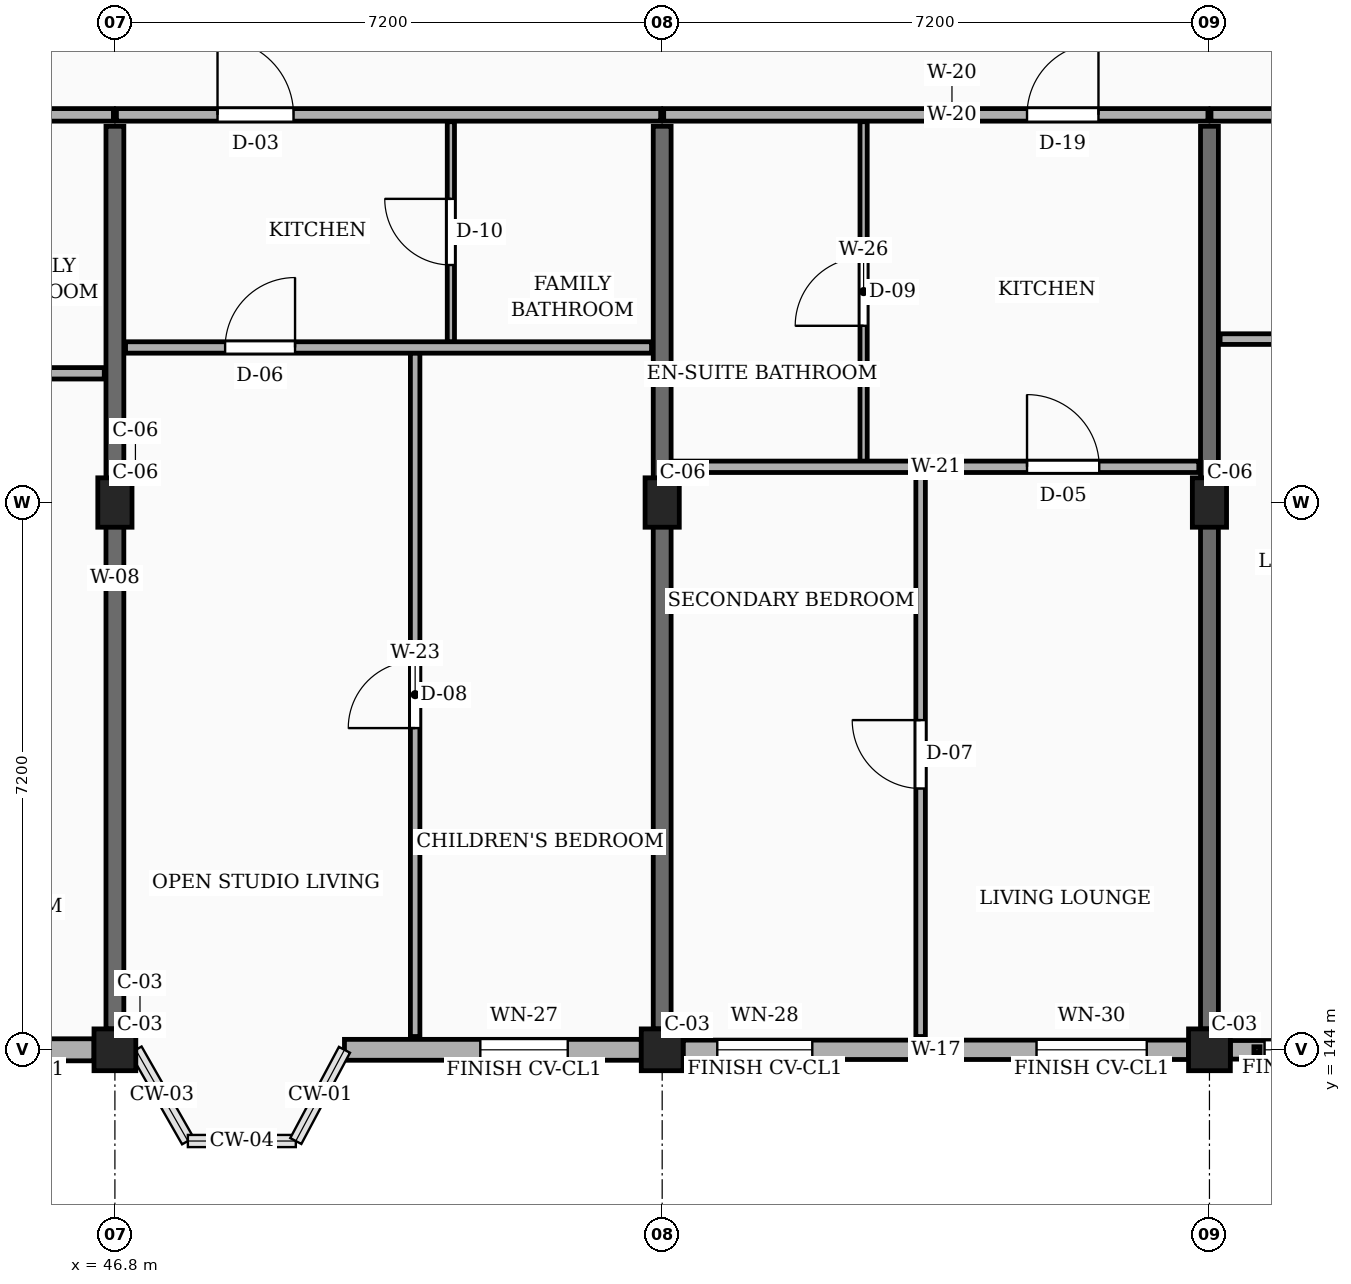
"""IFC4 building model, lengths in metres.
Left out: names, types, materials, properties, quantities, classifications, styles, units other than length and angle.
Written with IfcOpenShell. Run it as: python <this file> out.ifc"""

import sys

from ifc_helpers import new_model, si_unit, direction, frame, frame_2d, origin, origin_2d, place, context, subcontext, project, spatial, rectangle, extrude, element, fill, save


model = new_model("IFC4")
c1 = context("Model", 3, precision=1e-05, world=origin(), true_north=direction((0.0, 1.0)))
c2 = subcontext(c1, "Body", "Model", "MODEL_VIEW")
j1 = project(units=[si_unit("LENGTHUNIT", "METRE"), si_unit("PLANEANGLEUNIT", "RADIAN")], contexts=[c1])
p1 = place(None, origin())
s1 = spatial("IfcSite", under=j1, at=p1, CompositionType="ELEMENT")
p2 = place(p1, origin())
s2 = spatial("IfcBuilding", under=s1, at=p2, CompositionType="ELEMENT")
p3 = place(p2, frame((0.0, 0.0, 20.25)))
s3 = spatial("IfcBuildingStorey", under=s2, at=p3, CompositionType="ELEMENT", Elevation=20.25)
p4 = place(p3, frame((46.8, 144.0, 0.0), z_axis=(0.0, 0.0, 1.0), x_axis=(1.0, 0.0, 0.0)))
e1 = element("IfcColumn", 1, at=p4, inside=s3, PredefinedType="COLUMN", context=c2, shape_type="SweptSolid", body=[
    extrude(rectangle(XDim=0.55, YDim=0.55, at=origin_2d()), origin(), (0.0, 0.0, 1.0), 3.15),
])
p5 = place(p3, frame((46.8, 151.2, 0.0), z_axis=(0.0, 0.0, 1.0), x_axis=(1.0, 0.0, 0.0)))
e2 = element("IfcColumn", 2, at=p5, inside=s3, PredefinedType="COLUMN", context=c2, shape_type="SweptSolid", body=[
    extrude(rectangle(XDim=0.45, YDim=0.65, at=origin_2d()), origin(), (0.0, 0.0, 1.0), 3.15),
])
p6 = place(p3, frame((54.0, 144.0, 0.0), z_axis=(0.0, 0.0, 1.0), x_axis=(1.0, 0.0, 0.0)))
e3 = element("IfcColumn", 3, at=p6, inside=s3, PredefinedType="COLUMN", context=c2, shape_type="SweptSolid", body=[
    extrude(rectangle(XDim=0.55, YDim=0.55, at=origin_2d()), origin(), (0.0, 0.0, 1.0), 3.15),
])
p7 = place(p3, frame((54.0, 151.2, 0.0), z_axis=(0.0, 0.0, 1.0), x_axis=(1.0, 0.0, 0.0)))
e4 = element("IfcColumn", 4, at=p7, inside=s3, PredefinedType="COLUMN", context=c2, shape_type="SweptSolid", body=[
    extrude(rectangle(XDim=0.45, YDim=0.65, at=origin_2d()), origin(), (0.0, 0.0, 1.0), 3.15),
])
p8 = place(p3, frame((61.2, 144.0, 0.0), z_axis=(0.0, 0.0, 1.0), x_axis=(1.0, 0.0, 0.0)))
e5 = element("IfcColumn", 5, at=p8, inside=s3, PredefinedType="COLUMN", context=c2, shape_type="SweptSolid", body=[
    extrude(rectangle(XDim=0.55, YDim=0.55, at=origin_2d()), origin(), (0.0, 0.0, 1.0), 3.15),
])
p9 = place(p3, frame((61.2, 151.2, 0.0), z_axis=(0.0, 0.0, 1.0), x_axis=(1.0, 0.0, 0.0)))
e6 = element("IfcColumn", 6, at=p9, inside=s3, PredefinedType="COLUMN", context=c2, shape_type="SweptSolid", body=[
    extrude(rectangle(XDim=0.45, YDim=0.65, at=origin_2d()), origin(), (0.0, 0.0, 1.0), 3.15),
])
for number, where, z_axis, x_axis in (
    (7, (46.8, 144.275, 0.0), (0.0, 0.0, 1.0), (0.0, 1.0, 0.0)),
    (8, (54.0, 144.275, 0.0), (0.0, 0.0, 1.0), (0.0, 1.0, 0.0)),
    (9, (61.2, 144.275, 0.0), (0.0, 0.0, 1.0), (0.0, 1.0, 0.0)),
):
    element("IfcWall", number, at=place(p3, frame(where, z_axis=z_axis, x_axis=x_axis)), inside=s3, PredefinedType="SOLIDWALL", context=c2, shape_type="SweptSolid", body=[
        extrude(rectangle(XDim=11.875, YDim=0.235, at=frame_2d((5.938, 0.0))), origin(), (0.0, 0.0, 1.0), 2.185),
    ])
p10 = place(p3, frame((39.875, 144.0, 0.0), z_axis=(0.0, 0.0, 1.0), x_axis=(1.0, 0.0, 0.0)))
e10 = element("IfcWall", 10, at=p10, inside=s3, PredefinedType="SOLIDWALL", context=c2, shape_type="SweptSolid", body=[
    extrude(rectangle(XDim=6.65, YDim=0.29, at=frame_2d((3.325, 0.0))), origin(), (0.0, 0.0, 1.0), 2.455),
])
p11 = place(p10, frame((0.45, 0.0, 0.78)))
e11 = element("IfcOpeningElement", 11, at=p11, cuts=e10, PredefinedType="OPENING", context=c2, shape_type="SweptSolid", body=[
    extrude(rectangle(XDim=0.94, YDim=1.44, at=frame_2d((0.47, 0.72))), frame((0.0, 0.155, 0.0), z_axis=(0.0, -1.0, 0.0), x_axis=(1.0, 0.0, 0.0)), (0.0, 0.0, 1.0), 0.31),
])
p12 = place(p10, frame((4.65, 0.0, 0.78)))
e12 = element("IfcOpeningElement", 12, at=p12, cuts=e10, PredefinedType="OPENING", context=c2, shape_type="SweptSolid", body=[
    extrude(rectangle(XDim=1.15, YDim=1.44, at=frame_2d((0.575, 0.72))), frame((0.0, 0.155, 0.0), z_axis=(0.0, -1.0, 0.0), x_axis=(1.0, 0.0, 0.0)), (0.0, 0.0, 1.0), 0.31),
])
p13 = place(p3, frame((49.82, 144.0, 0.0), z_axis=(0.0, 0.0, 1.0), x_axis=(1.0, 0.0, 0.0)))
e13 = element("IfcWall", 13, at=p13, inside=s3, PredefinedType="SOLIDWALL", context=c2, shape_type="SweptSolid", body=[
    extrude(rectangle(XDim=3.905, YDim=0.275, at=frame_2d((1.953, 0.0))), origin(), (0.0, 0.0, 1.0), 2.455),
])
p14 = place(p13, frame((1.788, 0.0, 0.78)))
e14 = element("IfcOpeningElement", 14, at=p14, cuts=e13, PredefinedType="OPENING", context=c2, shape_type="SweptSolid", body=[
    extrude(rectangle(XDim=1.15, YDim=1.44, at=frame_2d((0.575, 0.72))), frame((0.0, 0.147, 0.0), z_axis=(0.0, -1.0, 0.0), x_axis=(1.0, 0.0, 0.0)), (0.0, 0.0, 1.0), 0.295),
])
p15 = place(p3, frame((54.275, 144.0, 0.0), z_axis=(0.0, 0.0, 1.0), x_axis=(1.0, 0.0, 0.0)))
e15 = element("IfcWall", 15, at=p15, inside=s3, PredefinedType="SOLIDWALL", context=c2, shape_type="SweptSolid", body=[
    extrude(rectangle(XDim=6.65, YDim=0.255, at=frame_2d((3.325, 0.0))), origin(), (0.0, 0.0, 1.0), 2.455),
])
p16 = place(p15, frame((0.45, 0.0, 0.78)))
e16 = element("IfcOpeningElement", 16, at=p16, cuts=e15, PredefinedType="OPENING", context=c2, shape_type="SweptSolid", body=[
    extrude(rectangle(XDim=1.25, YDim=1.44, at=frame_2d((0.625, 0.72))), frame((0.0, 0.137, 0.0), z_axis=(0.0, -1.0, 0.0), x_axis=(1.0, 0.0, 0.0)), (0.0, 0.0, 1.0), 0.275),
])
p17 = place(p15, frame((4.65, 0.0, 0.78)))
e17 = element("IfcOpeningElement", 17, at=p17, cuts=e15, PredefinedType="OPENING", context=c2, shape_type="SweptSolid", body=[
    extrude(rectangle(XDim=1.45, YDim=1.44, at=frame_2d((0.725, 0.72))), frame((0.0, 0.137, 0.0), z_axis=(0.0, -1.0, 0.0), x_axis=(1.0, 0.0, 0.0)), (0.0, 0.0, 1.0), 0.275),
])
p18 = place(p3, frame((61.475, 144.0, 0.0), z_axis=(0.0, 0.0, 1.0), x_axis=(1.0, 0.0, 0.0)))
e18 = element("IfcWall", 18, at=p18, inside=s3, PredefinedType="SOLIDWALL", context=c2, shape_type="SweptSolid", body=[
    extrude(rectangle(XDim=6.65, YDim=0.245, at=frame_2d((3.325, 0.0))), origin(), (0.0, 0.0, 1.0), 2.455),
])
p19 = place(p18, frame((0.45, 0.0, 0.78)))
e19 = element("IfcOpeningElement", 19, at=p19, cuts=e18, PredefinedType="OPENING", context=c2, shape_type="SweptSolid", body=[
    extrude(rectangle(XDim=1.45, YDim=1.44, at=frame_2d((0.725, 0.72))), frame((0.0, 0.133, 0.0), z_axis=(0.0, -1.0, 0.0), x_axis=(1.0, 0.0, 0.0)), (0.0, 0.0, 1.0), 0.265),
])
p20 = place(p18, frame((4.65, 0.0, 0.78)))
e20 = element("IfcOpeningElement", 20, at=p20, cuts=e18, PredefinedType="OPENING", context=c2, shape_type="SweptSolid", body=[
    extrude(rectangle(XDim=0.92, YDim=1.15, at=frame_2d((0.46, 0.575))), frame((0.0, 0.133, 0.0), z_axis=(0.0, -1.0, 0.0), x_axis=(1.0, 0.0, 0.0)), (0.0, 0.0, 1.0), 0.265),
])
p21 = place(p3, frame((39.62, 156.3, 0.0), z_axis=(0.0, 0.0, 1.0), x_axis=(1.0, 0.0, 0.0)))
e21 = element("IfcWall", 21, at=p21, inside=s3, PredefinedType="PARTITIONING", context=c2, shape_type="SweptSolid", body=[
    extrude(rectangle(XDim=7.16, YDim=0.165, at=frame_2d((3.58, 0.0))), origin(), (0.0, 0.0, 1.0), 2.32),
])
p22 = place(p21, frame((1.33, 0.0, 0.0)))
e22 = element("IfcOpeningElement", 22, at=p22, cuts=e21, PredefinedType="OPENING", context=c2, shape_type="SweptSolid", body=[
    extrude(rectangle(XDim=1.14, YDim=2.18, at=frame_2d((0.57, 1.09))), frame((0.0, 0.093, 0.0), z_axis=(0.0, -1.0, 0.0), x_axis=(1.0, 0.0, 0.0)), (0.0, 0.0, 1.0), 0.185),
])
p23 = place(p3, frame((46.82, 156.3, 0.0), z_axis=(0.0, 0.0, 1.0), x_axis=(1.0, 0.0, 0.0)))
e23 = element("IfcWall", 23, at=p23, inside=s3, PredefinedType="PARTITIONING", context=c2, shape_type="SweptSolid", body=[
    extrude(rectangle(XDim=7.16, YDim=0.165, at=frame_2d((3.58, 0.0))), origin(), (0.0, 0.0, 1.0), 2.32),
])
p24 = place(p23, frame((1.33, 0.0, 0.0)))
e24 = element("IfcOpeningElement", 24, at=p24, cuts=e23, PredefinedType="OPENING", context=c2, shape_type="SweptSolid", body=[
    extrude(rectangle(XDim=1.0, YDim=2.15, at=frame_2d((0.5, 1.075))), frame((0.0, 0.093, 0.0), z_axis=(0.0, -1.0, 0.0), x_axis=(1.0, 0.0, 0.0)), (0.0, 0.0, 1.0), 0.185),
])
p25 = place(p3, frame((54.02, 156.3, 0.0), z_axis=(0.0, 0.0, 1.0), x_axis=(1.0, 0.0, 0.0)))
e25 = element("IfcWall", 25, at=p25, inside=s3, PredefinedType="PARTITIONING", context=c2, shape_type="SweptSolid", body=[
    extrude(rectangle(XDim=7.16, YDim=0.165, at=frame_2d((3.58, 0.0))), origin(), (0.0, 0.0, 1.0), 2.32),
])
p26 = place(p25, frame((4.78, 0.0, 0.0)))
e26 = element("IfcOpeningElement", 26, at=p26, cuts=e25, PredefinedType="OPENING", context=c2, shape_type="SweptSolid", body=[
    extrude(rectangle(XDim=0.94, YDim=2.12, at=frame_2d((0.47, 1.06))), frame((0.0, 0.093, 0.0), z_axis=(0.0, -1.0, 0.0), x_axis=(1.0, 0.0, 0.0)), (0.0, 0.0, 1.0), 0.185),
])
p27 = place(p3, frame((61.22, 156.3, 0.0), z_axis=(0.0, 0.0, 1.0), x_axis=(1.0, 0.0, 0.0)))
e27 = element("IfcWall", 27, at=p27, inside=s3, PredefinedType="PARTITIONING", context=c2, shape_type="SweptSolid", body=[
    extrude(rectangle(XDim=7.16, YDim=0.165, at=frame_2d((3.58, 0.0))), origin(), (0.0, 0.0, 1.0), 2.32),
])
p28 = place(p27, frame((1.33, 0.0, 0.0)))
e28 = element("IfcOpeningElement", 28, at=p28, cuts=e27, PredefinedType="OPENING", context=c2, shape_type="SweptSolid", body=[
    extrude(rectangle(XDim=1.14, YDim=2.18, at=frame_2d((0.57, 1.09))), frame((0.0, 0.093, 0.0), z_axis=(0.0, -1.0, 0.0), x_axis=(1.0, 0.0, 0.0)), (0.0, 0.0, 1.0), 0.185),
])
p29 = place(p3, frame((39.74, 152.9, 0.0), z_axis=(0.0, 0.0, 1.0), x_axis=(1.0, 0.0, 0.0)))
e29 = element("IfcWall", 29, at=p29, inside=s3, PredefinedType="PARTITIONING", context=c2, shape_type="SweptSolid", body=[
    extrude(rectangle(XDim=6.92, YDim=0.15, at=frame_2d((3.46, 0.0))), origin(), (0.0, 0.0, 1.0), 2.32),
])
p30 = place(p29, frame((1.31, 0.0, 0.0)))
e30 = element("IfcOpeningElement", 30, at=p30, cuts=e29, PredefinedType="OPENING", context=c2, shape_type="SweptSolid", body=[
    extrude(rectangle(XDim=0.95, YDim=2.1, at=frame_2d((0.475, 1.05))), frame((0.0, 0.085, 0.0), z_axis=(0.0, -1.0, 0.0), x_axis=(1.0, 0.0, 0.0)), (0.0, 0.0, 1.0), 0.17),
])
p31 = place(p3, frame((50.75, 144.175, 0.0), z_axis=(0.0, 0.0, 1.0), x_axis=(0.0, 1.0, 0.0)))
e31 = element("IfcWall", 31, at=p31, inside=s3, PredefinedType="PARTITIONING", context=c2, shape_type="SweptSolid", body=[
    extrude(rectangle(XDim=8.995, YDim=0.125, at=frame_2d((4.498, 0.0))), origin(), (0.0, 0.0, 1.0), 2.32),
])
p32 = place(p31, frame((4.058, 0.0, 0.0)))
e32 = element("IfcOpeningElement", 32, at=p32, cuts=e31, PredefinedType="OPENING", context=c2, shape_type="SweptSolid", body=[
    extrude(rectangle(XDim=0.88, YDim=2.08, at=frame_2d((0.44, 1.04))), frame((0.0, 0.073, 0.0), z_axis=(0.0, -1.0, 0.0), x_axis=(1.0, 0.0, 0.0)), (0.0, 0.0, 1.0), 0.145),
])
p33 = place(p3, frame((51.22, 153.31, 0.0), z_axis=(0.0, 0.0, 1.0), x_axis=(0.0, 1.0, 0.0)))
e33 = element("IfcWall", 33, at=p33, inside=s3, PredefinedType="PARTITIONING", context=c2, shape_type="SweptSolid", body=[
    extrude(rectangle(XDim=2.9, YDim=0.095, at=frame_2d((1.45, 0.0))), origin(), (0.0, 0.0, 1.0), 2.32),
])
p34 = place(p33, frame((1.015, 0.0, 0.0)))
e34 = element("IfcOpeningElement", 34, at=p34, cuts=e33, PredefinedType="OPENING", context=c2, shape_type="SweptSolid", body=[
    extrude(rectangle(XDim=0.87, YDim=2.05, at=frame_2d((0.435, 1.025))), frame((0.0, 0.058, 0.0), z_axis=(0.0, -1.0, 0.0), x_axis=(1.0, 0.0, 0.0)), (0.0, 0.0, 1.0), 0.115),
])
p35 = place(p3, frame((46.94, 153.24, 0.0), z_axis=(0.0, 0.0, 1.0), x_axis=(1.0, 0.0, 0.0)))
e35 = element("IfcWall", 35, at=p35, inside=s3, PredefinedType="PARTITIONING", context=c2, shape_type="SweptSolid", body=[
    extrude(rectangle(XDim=6.92, YDim=0.15, at=frame_2d((3.46, 0.0))), origin(), (0.0, 0.0, 1.0), 2.32),
])
p36 = place(p35, frame((1.31, 0.0, 0.0)))
e36 = element("IfcOpeningElement", 36, at=p36, cuts=e35, PredefinedType="OPENING", context=c2, shape_type="SweptSolid", body=[
    extrude(rectangle(XDim=0.92, YDim=2.1, at=frame_2d((0.46, 1.05))), frame((0.0, 0.085, 0.0), z_axis=(0.0, -1.0, 0.0), x_axis=(1.0, 0.0, 0.0)), (0.0, 0.0, 1.0), 0.17),
])
p37 = place(p3, frame((57.4, 144.175, 0.0), z_axis=(0.0, 0.0, 1.0), x_axis=(0.0, 1.0, 0.0)))
e37 = element("IfcWall", 37, at=p37, inside=s3, PredefinedType="PARTITIONING", context=c2, shape_type="SweptSolid", body=[
    extrude(rectangle(XDim=7.425, YDim=0.125, at=frame_2d((3.712, 0.0))), origin(), (0.0, 0.0, 1.0), 2.32),
])
p38 = place(p37, frame((3.262, 0.0, 0.0)))
e38 = element("IfcOpeningElement", 38, at=p38, cuts=e37, PredefinedType="OPENING", context=c2, shape_type="SweptSolid", body=[
    extrude(rectangle(XDim=0.9, YDim=2.1, at=frame_2d((0.45, 1.05))), frame((0.0, 0.073, 0.0), z_axis=(0.0, -1.0, 0.0), x_axis=(1.0, 0.0, 0.0)), (0.0, 0.0, 1.0), 0.145),
])
p39 = place(p3, frame((56.65, 151.74, 0.0), z_axis=(0.0, 0.0, 1.0), x_axis=(0.0, 1.0, 0.0)))
e39 = element("IfcWall", 39, at=p39, inside=s3, PredefinedType="PARTITIONING", context=c2, shape_type="SweptSolid", body=[
    extrude(rectangle(XDim=4.47, YDim=0.095, at=frame_2d((2.235, 0.0))), origin(), (0.0, 0.0, 1.0), 2.32),
])
p40 = place(p39, frame((1.785, 0.0, 0.0)))
e40 = element("IfcOpeningElement", 40, at=p40, cuts=e39, PredefinedType="OPENING", context=c2, shape_type="SweptSolid", body=[
    extrude(rectangle(XDim=0.9, YDim=2.05, at=frame_2d((0.45, 1.025))), frame((0.0, 0.058, 0.0), z_axis=(0.0, -1.0, 0.0), x_axis=(1.0, 0.0, 0.0)), (0.0, 0.0, 1.0), 0.115),
])
p41 = place(p3, frame((54.14, 151.67, 0.0), z_axis=(0.0, 0.0, 1.0), x_axis=(1.0, 0.0, 0.0)))
e41 = element("IfcWall", 41, at=p41, inside=s3, PredefinedType="PARTITIONING", context=c2, shape_type="SweptSolid", body=[
    extrude(rectangle(XDim=6.92, YDim=0.15, at=frame_2d((3.46, 0.0))), origin(), (0.0, 0.0, 1.0), 2.32),
])
p42 = place(p41, frame((4.66, 0.0, 0.0)))
e42 = element("IfcOpeningElement", 42, at=p42, cuts=e41, PredefinedType="OPENING", context=c2, shape_type="SweptSolid", body=[
    extrude(rectangle(XDim=0.95, YDim=2.1, at=frame_2d((0.475, 1.05))), frame((0.0, 0.085, 0.0), z_axis=(0.0, -1.0, 0.0), x_axis=(1.0, 0.0, 0.0)), (0.0, 0.0, 1.0), 0.17),
])
p43 = place(p3, frame((61.34, 153.35, 0.0), z_axis=(0.0, 0.0, 1.0), x_axis=(1.0, 0.0, 0.0)))
e43 = element("IfcWall", 43, at=p43, inside=s3, PredefinedType="PARTITIONING", context=c2, shape_type="SweptSolid", body=[
    extrude(rectangle(XDim=6.92, YDim=0.14, at=frame_2d((3.46, 0.0))), origin(), (0.0, 0.0, 1.0), 2.32),
])
p44 = place(p43, frame((1.31, 0.0, 0.0)))
e44 = element("IfcOpeningElement", 44, at=p44, cuts=e43, PredefinedType="OPENING", context=c2, shape_type="SweptSolid", body=[
    extrude(rectangle(XDim=0.95, YDim=2.1, at=frame_2d((0.475, 1.05))), frame((0.0, 0.08, 0.0), z_axis=(0.0, -1.0, 0.0), x_axis=(1.0, 0.0, 0.0)), (0.0, 0.0, 1.0), 0.16),
])
p45 = place(p14, origin())
e45 = element("IfcWindow", 45, at=p45, inside=s3, PartitioningType="SINGLE_PANEL", PredefinedType="WINDOW", context=c2, shape_type="SweptSolid", body=[
    extrude(rectangle(XDim=1.15, YDim=1.44, at=frame_2d((0.575, 0.72))), frame((0.0, 0.03, 0.0), z_axis=(0.0, -1.0, 0.0), x_axis=(1.0, 0.0, 0.0)), (0.0, 0.0, 1.0), 0.06),
])
fill(e14, e45)
p46 = place(p16, origin())
e46 = element("IfcWindow", 46, at=p46, inside=s3, PartitioningType="SINGLE_PANEL", PredefinedType="WINDOW", context=c2, shape_type="SweptSolid", body=[
    extrude(rectangle(XDim=1.25, YDim=1.44, at=frame_2d((0.625, 0.72))), frame((0.0, 0.03, 0.0), z_axis=(0.0, -1.0, 0.0), x_axis=(1.0, 0.0, 0.0)), (0.0, 0.0, 1.0), 0.06),
])
fill(e16, e46)
p47 = place(p17, origin())
e47 = element("IfcWindow", 47, at=p47, inside=s3, PartitioningType="SINGLE_PANEL", PredefinedType="WINDOW", context=c2, shape_type="SweptSolid", body=[
    extrude(rectangle(XDim=1.45, YDim=1.44, at=frame_2d((0.725, 0.72))), frame((0.0, 0.03, 0.0), z_axis=(0.0, -1.0, 0.0), x_axis=(1.0, 0.0, 0.0)), (0.0, 0.0, 1.0), 0.06),
])
fill(e17, e47)
p48 = place(p19, origin())
e48 = element("IfcWindow", 48, at=p48, inside=s3, PartitioningType="SINGLE_PANEL", PredefinedType="WINDOW", context=c2, shape_type="SweptSolid", body=[
    extrude(rectangle(XDim=1.45, YDim=1.44, at=frame_2d((0.725, 0.72))), frame((0.0, 0.03, 0.0), z_axis=(0.0, -1.0, 0.0), x_axis=(1.0, 0.0, 0.0)), (0.0, 0.0, 1.0), 0.06),
])
fill(e19, e48)
p49 = place(p24, origin())
e49 = element("IfcDoor", 49, at=p49, inside=s3, OperationType="SINGLE_SWING_LEFT", PredefinedType="DOOR", context=c2, shape_type="SweptSolid", body=[
    extrude(rectangle(XDim=1.0, YDim=2.15, at=frame_2d((0.5, 1.075))), frame((0.0, 0.025, 0.0), z_axis=(0.0, -1.0, 0.0), x_axis=(1.0, 0.0, 0.0)), (0.0, 0.0, 1.0), 0.05),
])
fill(e24, e49)
p50 = place(p26, origin())
e50 = element("IfcDoor", 50, at=p50, inside=s3, OperationType="SINGLE_SWING_RIGHT", PredefinedType="DOOR", context=c2, shape_type="SweptSolid", body=[
    extrude(rectangle(XDim=0.94, YDim=2.12, at=frame_2d((0.47, 1.06))), frame((0.0, 0.025, 0.0), z_axis=(0.0, -1.0, 0.0), x_axis=(1.0, 0.0, 0.0)), (0.0, 0.0, 1.0), 0.05),
])
fill(e26, e50)
p51 = place(p32, origin())
e51 = element("IfcDoor", 51, at=p51, inside=s3, OperationType="SINGLE_SWING_LEFT", PredefinedType="DOOR", context=c2, shape_type="SweptSolid", body=[
    extrude(rectangle(XDim=0.88, YDim=2.08, at=frame_2d((0.44, 1.04))), frame((0.0, 0.025, 0.0), z_axis=(0.0, -1.0, 0.0), x_axis=(1.0, 0.0, 0.0)), (0.0, 0.0, 1.0), 0.05),
])
fill(e32, e51)
p52 = place(p34, origin())
e52 = element("IfcDoor", 52, at=p52, inside=s3, OperationType="SINGLE_SWING_RIGHT", PredefinedType="DOOR", context=c2, shape_type="SweptSolid", body=[
    extrude(rectangle(XDim=0.87, YDim=2.05, at=frame_2d((0.435, 1.025))), frame((0.0, 0.025, 0.0), z_axis=(0.0, -1.0, 0.0), x_axis=(1.0, 0.0, 0.0)), (0.0, 0.0, 1.0), 0.05),
])
fill(e34, e52)
p53 = place(p36, origin())
e53 = element("IfcDoor", 53, at=p53, inside=s3, OperationType="SINGLE_SWING_RIGHT", PredefinedType="DOOR", context=c2, shape_type="SweptSolid", body=[
    extrude(rectangle(XDim=0.92, YDim=2.1, at=frame_2d((0.46, 1.05))), frame((0.0, 0.025, 0.0), z_axis=(0.0, -1.0, 0.0), x_axis=(1.0, 0.0, 0.0)), (0.0, 0.0, 1.0), 0.05),
])
fill(e36, e53)
p54 = place(p38, origin())
e54 = element("IfcDoor", 54, at=p54, inside=s3, OperationType="SINGLE_SWING_RIGHT", PredefinedType="DOOR", context=c2, shape_type="SweptSolid", body=[
    extrude(rectangle(XDim=0.9, YDim=2.1, at=frame_2d((0.45, 1.05))), frame((0.0, 0.025, 0.0), z_axis=(0.0, -1.0, 0.0), x_axis=(1.0, 0.0, 0.0)), (0.0, 0.0, 1.0), 0.05),
])
fill(e38, e54)
p55 = place(p40, origin())
e55 = element("IfcDoor", 55, at=p55, inside=s3, OperationType="SINGLE_SWING_LEFT", PredefinedType="DOOR", context=c2, shape_type="SweptSolid", body=[
    extrude(rectangle(XDim=0.9, YDim=2.05, at=frame_2d((0.45, 1.025))), frame((0.0, 0.025, 0.0), z_axis=(0.0, -1.0, 0.0), x_axis=(1.0, 0.0, 0.0)), (0.0, 0.0, 1.0), 0.05),
])
fill(e40, e55)
p56 = place(p42, origin())
e56 = element("IfcDoor", 56, at=p56, inside=s3, OperationType="SINGLE_SWING_LEFT", PredefinedType="DOOR", context=c2, shape_type="SweptSolid", body=[
    extrude(rectangle(XDim=0.95, YDim=2.1, at=frame_2d((0.475, 1.05))), frame((0.0, 0.025, 0.0), z_axis=(0.0, -1.0, 0.0), x_axis=(1.0, 0.0, 0.0)), (0.0, 0.0, 1.0), 0.05),
])
fill(e42, e56)
save(model, sys.argv[1])
